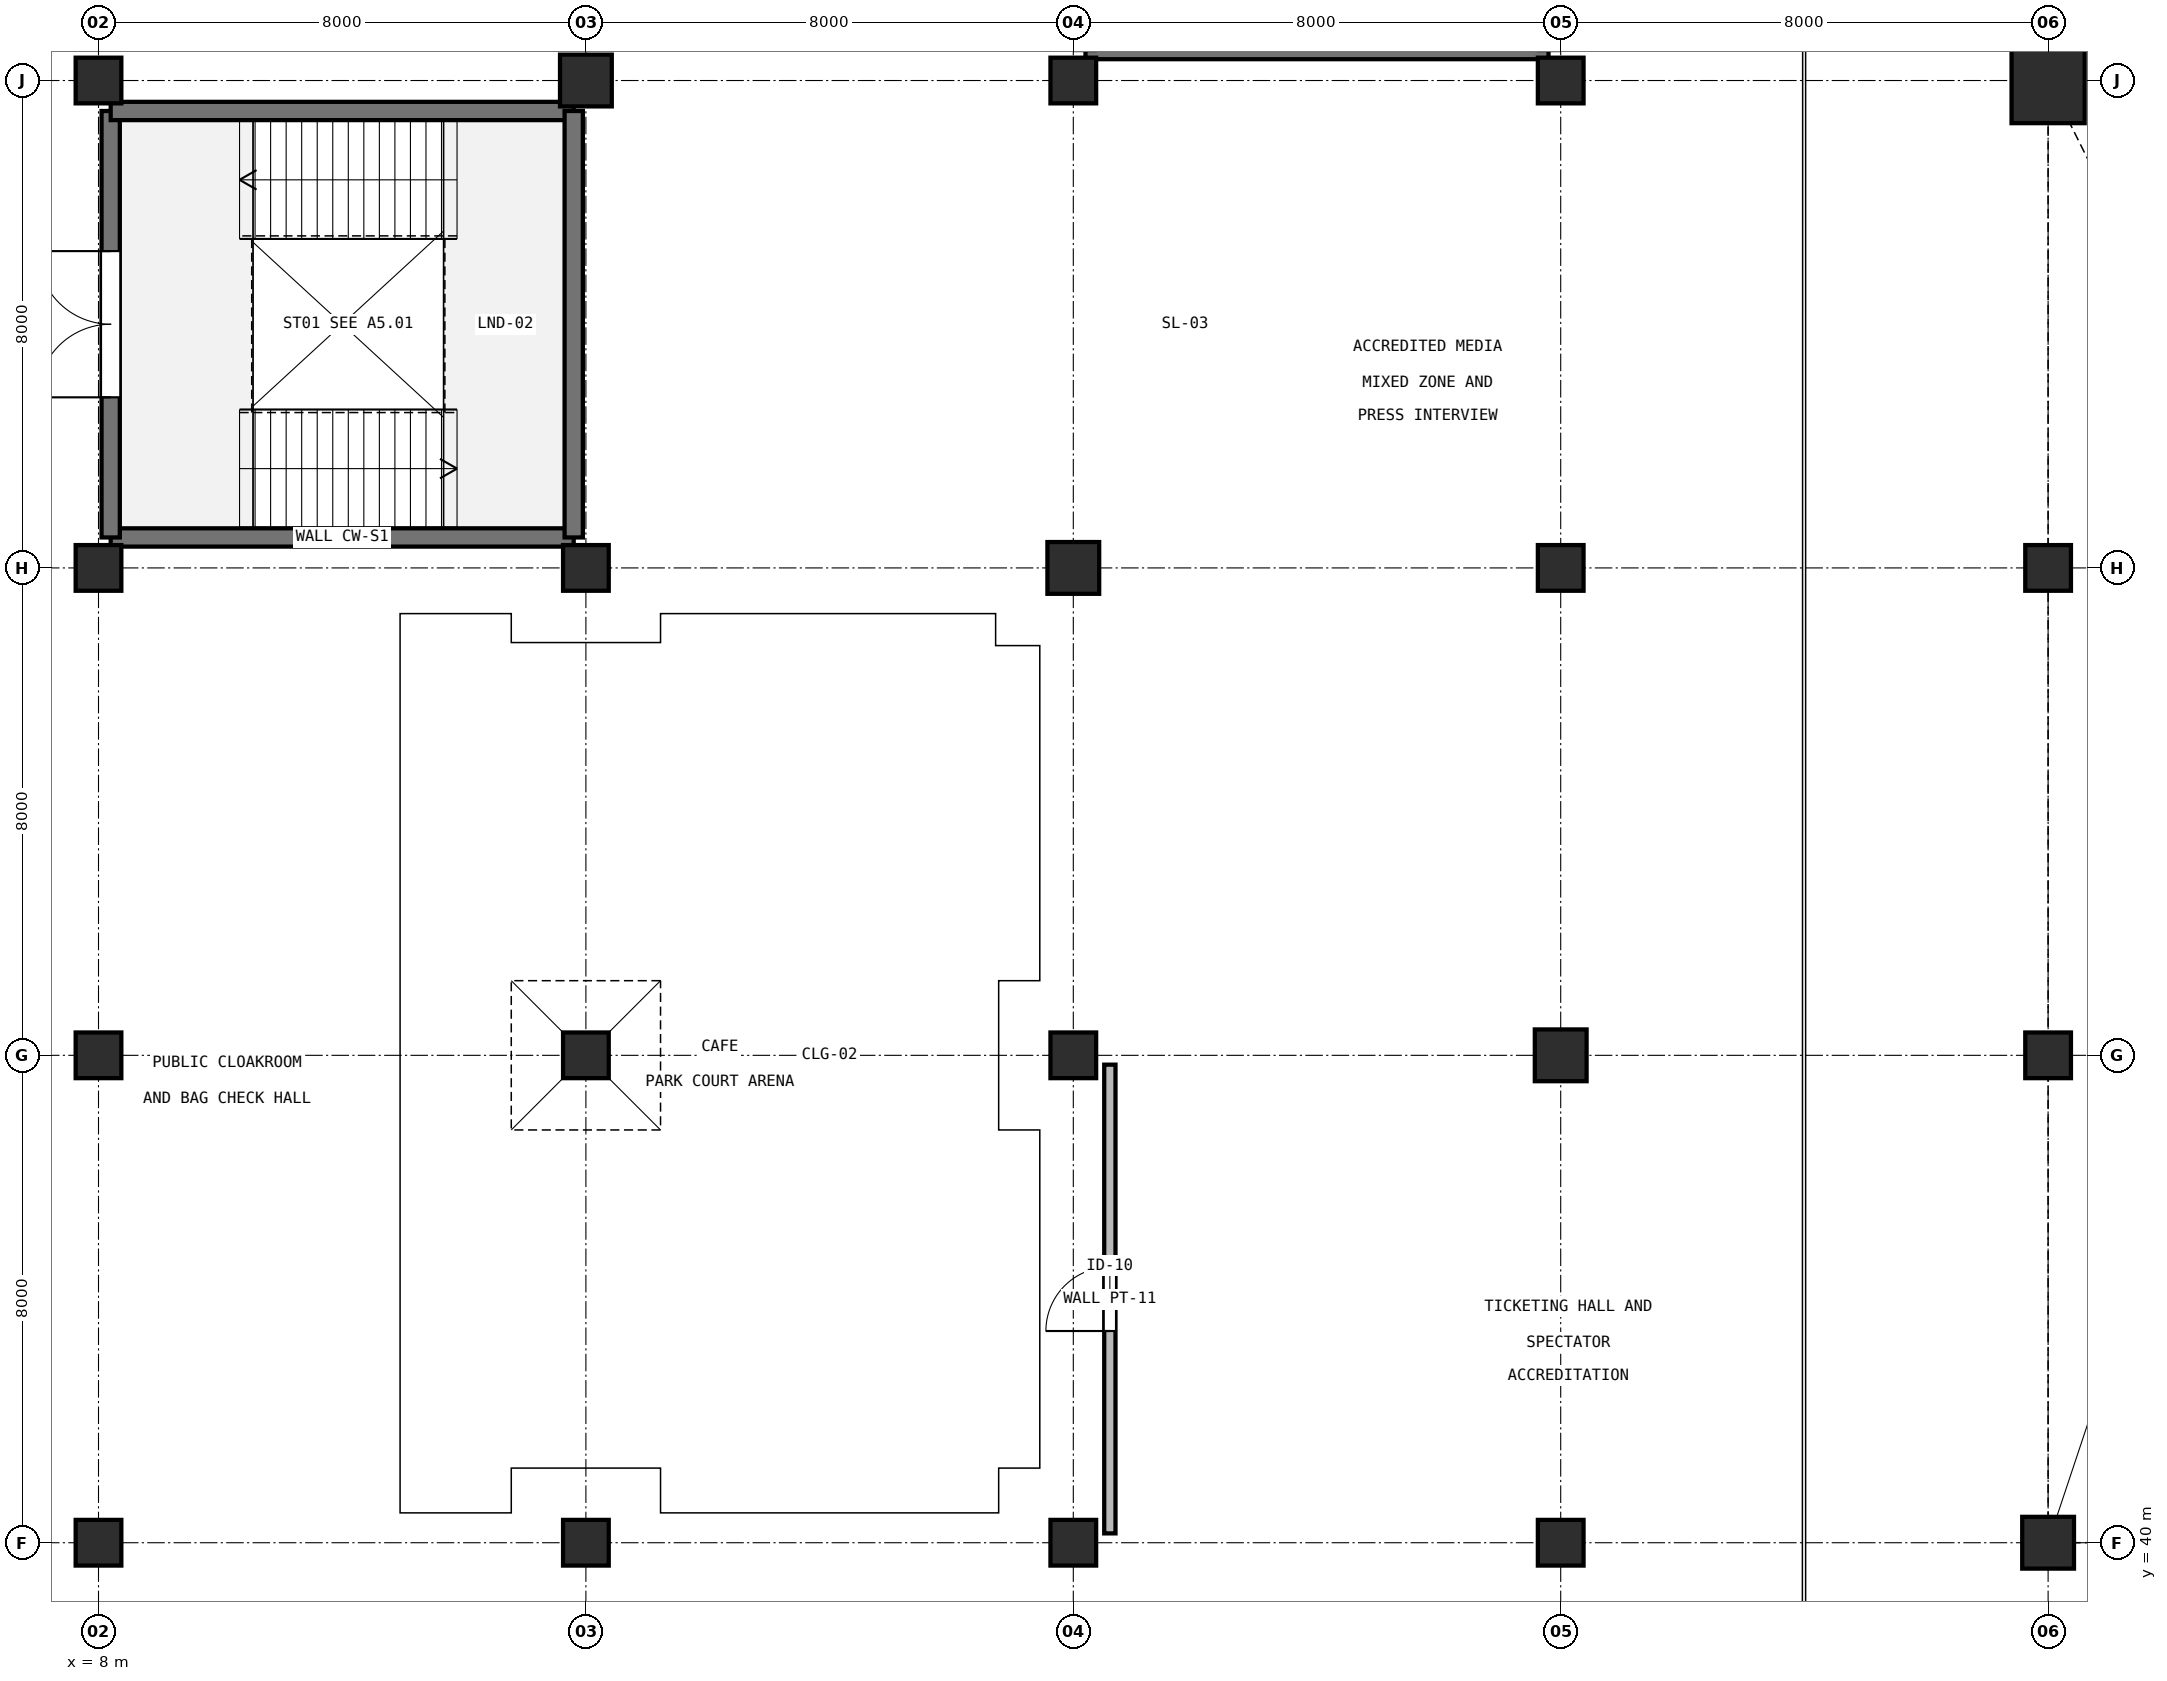
"""IFC4 building model, lengths in metres.
Left out: names, types, materials, properties, quantities, classifications, styles, units other than length and angle.
Written with IfcOpenShell. Run it as: python <this file> out.ifc"""

import sys

from ifc_helpers import new_model, si_unit, direction, frame, frame_2d, origin, origin_2d, place, context, subcontext, project, spatial, rectangle, extrude, element, fill, save


model = new_model("IFC4")
c1 = context("Model", 3, precision=1e-05, world=origin(), true_north=direction((0.0, 1.0)))
c2 = subcontext(c1, "Body", "Model", "MODEL_VIEW")
j1 = project(units=[si_unit("LENGTHUNIT", "METRE"), si_unit("PLANEANGLEUNIT", "RADIAN")], contexts=[c1])
p1 = place(None, origin())
s1 = spatial("IfcSite", under=j1, at=p1, CompositionType="ELEMENT")
p2 = place(p1, origin())
s2 = spatial("IfcBuilding", under=s1, at=p2, CompositionType="ELEMENT")
p3 = place(p2, origin())
s3 = spatial("IfcBuildingStorey", under=s2, at=p3, CompositionType="ELEMENT", Elevation=0.0)
for number, where, z_axis, x_axis in (
    (1, (8.0, 40.0, 0.0), (0.0, 0.0, 1.0), (1.0, 0.0, 0.0)),
    (2, (8.0, 48.0, 0.0), (0.0, 0.0, 1.0), (1.0, 0.0, 0.0)),
    (3, (8.0, 56.0, 0.0), (0.0, 0.0, 1.0), (1.0, 0.0, 0.0)),
    (4, (8.0, 64.0, 0.0), (0.0, 0.0, 1.0), (1.0, 0.0, 0.0)),
    (5, (16.0, 40.0, 0.0), (0.0, 0.0, 1.0), (1.0, 0.0, 0.0)),
    (6, (16.0, 48.0, 0.0), (0.0, 0.0, 1.0), (1.0, 0.0, 0.0)),
    (7, (16.0, 56.0, 0.0), (0.0, 0.0, 1.0), (1.0, 0.0, 0.0)),
):
    element("IfcColumn", number, at=place(p3, frame(where, z_axis=z_axis, x_axis=x_axis)), inside=s3, PredefinedType="COLUMN", context=c2, shape_type="SweptSolid", body=[
        extrude(rectangle(XDim=0.75, YDim=0.75, at=origin_2d()), origin(), (0.0, 0.0, 1.0), 5.4),
    ])
p4 = place(p3, frame((16.0, 64.0, 0.0), z_axis=(0.0, 0.0, 1.0), x_axis=(1.0, 0.0, 0.0)))
e8 = element("IfcColumn", 8, at=p4, inside=s3, PredefinedType="COLUMN", context=c2, shape_type="SweptSolid", body=[
    extrude(rectangle(XDim=0.85, YDim=0.85, at=origin_2d()), origin(), (0.0, 0.0, 1.0), 5.4),
])
for number, where, z_axis, x_axis in (
    (9, (24.0, 40.0, 0.0), (0.0, 0.0, 1.0), (1.0, 0.0, 0.0)),
    (10, (24.0, 48.0, 0.0), (0.0, 0.0, 1.0), (1.0, 0.0, 0.0)),
):
    element("IfcColumn", number, at=place(p3, frame(where, z_axis=z_axis, x_axis=x_axis)), inside=s3, PredefinedType="COLUMN", context=c2, shape_type="SweptSolid", body=[
        extrude(rectangle(XDim=0.75, YDim=0.75, at=origin_2d()), origin(), (0.0, 0.0, 1.0), 5.4),
    ])
p5 = place(p3, frame((24.0, 56.0, 0.0), z_axis=(0.0, 0.0, 1.0), x_axis=(1.0, 0.0, 0.0)))
e11 = element("IfcColumn", 11, at=p5, inside=s3, PredefinedType="COLUMN", context=c2, shape_type="SweptSolid", body=[
    extrude(rectangle(XDim=0.85, YDim=0.85, at=origin_2d()), origin(), (0.0, 0.0, 1.0), 5.4),
])
for number, where, z_axis, x_axis in (
    (12, (24.0, 64.0, 0.0), (0.0, 0.0, 1.0), (1.0, 0.0, 0.0)),
    (13, (32.0, 40.0, 0.0), (0.0, 0.0, 1.0), (1.0, 0.0, 0.0)),
):
    element("IfcColumn", number, at=place(p3, frame(where, z_axis=z_axis, x_axis=x_axis)), inside=s3, PredefinedType="COLUMN", context=c2, shape_type="SweptSolid", body=[
        extrude(rectangle(XDim=0.75, YDim=0.75, at=origin_2d()), origin(), (0.0, 0.0, 1.0), 5.4),
    ])
p6 = place(p3, frame((32.0, 48.0, 0.0), z_axis=(0.0, 0.0, 1.0), x_axis=(1.0, 0.0, 0.0)))
e14 = element("IfcColumn", 14, at=p6, inside=s3, PredefinedType="COLUMN", context=c2, shape_type="SweptSolid", body=[
    extrude(rectangle(XDim=0.85, YDim=0.85, at=origin_2d()), origin(), (0.0, 0.0, 1.0), 5.4),
])
for number, where, z_axis, x_axis in (
    (15, (32.0, 56.0, 0.0), (0.0, 0.0, 1.0), (1.0, 0.0, 0.0)),
    (16, (32.0, 64.0, 0.0), (0.0, 0.0, 1.0), (1.0, 0.0, 0.0)),
):
    element("IfcColumn", number, at=place(p3, frame(where, z_axis=z_axis, x_axis=x_axis)), inside=s3, PredefinedType="COLUMN", context=c2, shape_type="SweptSolid", body=[
        extrude(rectangle(XDim=0.75, YDim=0.75, at=origin_2d()), origin(), (0.0, 0.0, 1.0), 5.4),
    ])
p7 = place(p3, frame((40.0, 40.0, 0.0), z_axis=(0.0, 0.0, 1.0), x_axis=(1.0, 0.0, 0.0)))
e17 = element("IfcColumn", 17, at=p7, inside=s3, PredefinedType="COLUMN", context=c2, shape_type="SweptSolid", body=[
    extrude(rectangle(XDim=0.85, YDim=0.85, at=origin_2d()), origin(), (0.0, 0.0, 1.0), 5.4),
])
for number, where, z_axis, x_axis in (
    (18, (40.0, 48.0, 0.0), (0.0, 0.0, 1.0), (1.0, 0.0, 0.0)),
    (19, (40.0, 56.0, 0.0), (0.0, 0.0, 1.0), (1.0, 0.0, 0.0)),
):
    element("IfcColumn", number, at=place(p3, frame(where, z_axis=z_axis, x_axis=x_axis)), inside=s3, PredefinedType="COLUMN", context=c2, shape_type="SweptSolid", body=[
        extrude(rectangle(XDim=0.75, YDim=0.75, at=origin_2d()), origin(), (0.0, 0.0, 1.0), 5.4),
    ])
p8 = place(p3, frame((40.0, 64.0, 0.0), z_axis=(0.0, 0.0, 1.0), x_axis=(1.0, 0.0, 0.0)))
e20 = element("IfcColumn", 20, at=p8, inside=s3, PredefinedType="COLUMN", context=c2, shape_type="SweptSolid", body=[
    extrude(rectangle(XDim=1.2, YDim=1.4, at=origin_2d()), origin(), (0.0, 0.0, 1.0), 5.4),
])
p9 = place(p3, frame((15.8, 56.5, 0.0), z_axis=(0.0, 0.0, 1.0), x_axis=(-1.0, 0.0, 0.0)))
e21 = element("IfcWall", 21, at=p9, inside=s3, PredefinedType="SHEAR", context=c2, shape_type="SweptSolid", body=[
    extrude(rectangle(XDim=7.6, YDim=0.3, at=frame_2d((3.8, 0.0))), origin(), (0.0, 0.0, 1.0), 5.08),
])
p10 = place(p3, frame((8.2, 56.5, 0.0), z_axis=(0.0, 0.0, 1.0), x_axis=(0.0, 1.0, 0.0)))
e22 = element("IfcWall", 22, at=p10, inside=s3, PredefinedType="SHEAR", context=c2, shape_type="SweptSolid", body=[
    extrude(rectangle(XDim=7.0, YDim=0.3, at=frame_2d((3.5, 0.0))), origin(), (0.0, 0.0, 1.0), 5.08),
])
p11 = place(p10, frame((2.3, 0.0, 0.0)))
e23 = element("IfcOpeningElement", 23, at=p11, cuts=e22, PredefinedType="OPENING", context=c2, shape_type="SweptSolid", body=[
    extrude(rectangle(XDim=2.4, YDim=2.2, at=frame_2d((1.2, 1.1))), frame((0.0, 0.16, 0.0), z_axis=(0.0, -1.0, 0.0), x_axis=(1.0, 0.0, 0.0)), (0.0, 0.0, 1.0), 0.32),
])
p12 = place(p3, frame((8.2, 63.5, 0.0), z_axis=(0.0, 0.0, 1.0), x_axis=(1.0, 0.0, 0.0)))
e24 = element("IfcWall", 24, at=p12, inside=s3, PredefinedType="SHEAR", context=c2, shape_type="SweptSolid", body=[
    extrude(rectangle(XDim=7.6, YDim=0.3, at=frame_2d((3.8, 0.0))), origin(), (0.0, 0.0, 1.0), 5.08),
])
p13 = place(p3, frame((15.8, 63.5, 0.0), z_axis=(0.0, 0.0, 1.0), x_axis=(0.0, -1.0, 0.0)))
e25 = element("IfcWall", 25, at=p13, inside=s3, PredefinedType="SHEAR", context=c2, shape_type="SweptSolid", body=[
    extrude(rectangle(XDim=7.0, YDim=0.3, at=frame_2d((3.5, 0.0))), origin(), (0.0, 0.0, 1.0), 5.08),
])
p14 = place(p3, frame((31.8, 64.5, 0.0), z_axis=(0.0, 0.0, 1.0), x_axis=(-1.0, 0.0, 0.0)))
e26 = element("IfcWall", 26, at=p14, inside=s3, PredefinedType="SHEAR", context=c2, shape_type="SweptSolid", body=[
    extrude(rectangle(XDim=7.6, YDim=0.3, at=frame_2d((3.8, 0.0))), origin(), (0.0, 0.0, 1.0), 5.08),
])
p15 = place(p3, frame((24.6, 40.153, 0.0), z_axis=(0.0, 0.0, 1.0), x_axis=(0.0, 1.0, 0.0)))
e27 = element("IfcWall", 27, at=p15, inside=s3, PredefinedType="PARTITIONING", context=c2, shape_type="SweptSolid", body=[
    extrude(rectangle(XDim=7.693, YDim=0.185, at=frame_2d((3.847, 0.0))), origin(), (0.0, 0.0, 1.0), 4.05),
])
p16 = place(p15, frame((3.322, 0.0, 0.0)))
e28 = element("IfcOpeningElement", 28, at=p16, cuts=e27, PredefinedType="OPENING", context=c2, shape_type="SweptSolid", body=[
    extrude(rectangle(XDim=1.05, YDim=2.15, at=frame_2d((0.525, 1.075))), frame((0.0, 0.103, 0.0), z_axis=(0.0, -1.0, 0.0), x_axis=(1.0, 0.0, 0.0)), (0.0, 0.0, 1.0), 0.205),
])
p17 = place(p11, origin())
e29 = element("IfcDoor", 29, at=p17, inside=s3, OperationType="DOUBLE_DOOR_SINGLE_SWING", PredefinedType="DOOR", context=c2, shape_type="SweptSolid", body=[
    extrude(rectangle(XDim=2.4, YDim=2.2, at=frame_2d((1.2, 1.1))), frame((0.0, 0.025, 0.0), z_axis=(0.0, -1.0, 0.0), x_axis=(1.0, 0.0, 0.0)), (0.0, 0.0, 1.0), 0.05),
])
fill(e23, e29)
p18 = place(p16, origin())
e30 = element("IfcDoor", 30, at=p18, inside=s3, OperationType="SINGLE_SWING_LEFT", PredefinedType="DOOR", context=c2, shape_type="SweptSolid", body=[
    extrude(rectangle(XDim=1.05, YDim=2.15, at=frame_2d((0.525, 1.075))), frame((0.0, 0.025, 0.0), z_axis=(0.0, -1.0, 0.0), x_axis=(1.0, 0.0, 0.0)), (0.0, 0.0, 1.0), 0.05),
])
fill(e28, e30)
save(model, sys.argv[1])
